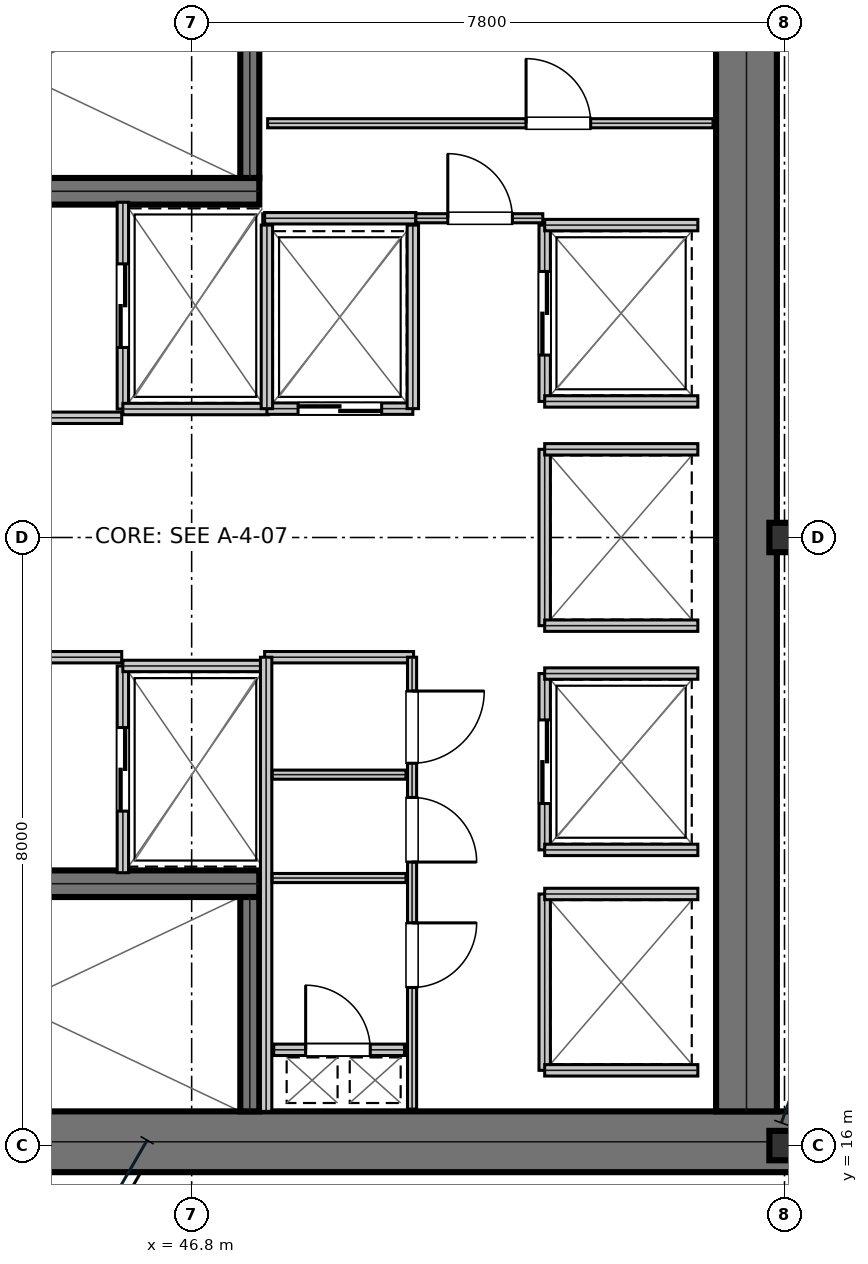
"""IFC4 building model, lengths in metres.
Left out: names, types, materials, properties, quantities, classifications, styles, units other than length and angle.
Written with IfcOpenShell. Run it as: python <this file> out.ifc"""

import sys

from ifc_helpers import new_model, si_unit, direction, frame, frame_2d, origin, origin_2d, place, context, subcontext, project, spatial, rectangle, i_section, extrude, element, fill, save


model = new_model("IFC4")
c1 = context("Model", 3, precision=1e-05, world=origin(), true_north=direction((0.0, 1.0)))
c2 = subcontext(c1, "Body", "Model", "MODEL_VIEW")
j1 = project(units=[si_unit("LENGTHUNIT", "METRE"), si_unit("PLANEANGLEUNIT", "RADIAN")], contexts=[c1])
p1 = place(None, origin())
s1 = spatial("IfcSite", under=j1, at=p1, CompositionType="ELEMENT")
p2 = place(p1, origin())
s2 = spatial("IfcBuilding", under=s1, at=p2, CompositionType="ELEMENT")
p3 = place(p2, frame((0.0, 0.0, 169.5)))
s3 = spatial("IfcBuildingStorey", under=s2, at=p3, CompositionType="ELEMENT", Elevation=169.5)
p4 = place(p3, frame((38.8, 16.05, 0.0), z_axis=(0.0, 0.0, 1.0), x_axis=(1.0, 0.0, 0.0)))
e1 = element("IfcWall", 1, at=p4, inside=s3, PredefinedType="SHEAR", context=c2, shape_type="SweptSolid", body=[
    extrude(rectangle(XDim=16.0, YDim=0.8, at=frame_2d((8.0, 0.0))), origin(), (0.0, 0.0, 1.0), 3.81),
])
p5 = place(p3, frame((54.1, 16.45, 0.0), z_axis=(0.0, 0.0, 1.0), x_axis=(0.0, 1.0, 0.0)))
e2 = element("IfcWall", 2, at=p5, inside=s3, PredefinedType="SHEAR", context=c2, shape_type="SweptSolid", body=[
    extrude(rectangle(XDim=15.1, YDim=0.8, at=frame_2d((7.55, 0.0))), origin(), (0.0, 0.0, 1.0), 3.81),
])
p6 = place(p3, frame((39.98, 28.555, 0.0), z_axis=(0.0, 0.0, 1.0), x_axis=(1.0, 0.0, 0.0)))
e3 = element("IfcWall", 3, at=p6, inside=s3, PredefinedType="SHEAR", context=c2, shape_type="SweptSolid", body=[
    extrude(rectangle(XDim=7.71, YDim=0.35, at=frame_2d((3.855, 0.0))), origin(), (0.0, 0.0, 1.0), 3.81),
])
p7 = place(p6, frame((0.25, 0.0, 0.0)))
e4 = element("IfcOpeningElement", 4, at=p7, cuts=e3, PredefinedType="OPENING", context=c2, shape_type="SweptSolid", body=[
    extrude(rectangle(XDim=1.1, YDim=2.15, at=frame_2d((0.55, 1.075))), frame((0.0, 0.185, 0.0), z_axis=(0.0, -1.0, 0.0), x_axis=(1.0, 0.0, 0.0)), (0.0, 0.0, 1.0), 0.37),
])
p8 = place(p3, frame((39.98, 19.445, 0.0), z_axis=(0.0, 0.0, 1.0), x_axis=(1.0, 0.0, 0.0)))
e5 = element("IfcWall", 5, at=p8, inside=s3, PredefinedType="SHEAR", context=c2, shape_type="SweptSolid", body=[
    extrude(rectangle(XDim=7.71, YDim=0.35, at=frame_2d((3.855, 0.0))), origin(), (0.0, 0.0, 1.0), 3.81),
])
p9 = place(p8, frame((0.25, 0.0, 0.0)))
e6 = element("IfcOpeningElement", 6, at=p9, cuts=e5, PredefinedType="OPENING", context=c2, shape_type="SweptSolid", body=[
    extrude(rectangle(XDim=1.1, YDim=2.15, at=frame_2d((0.55, 1.075))), frame((0.0, 0.185, 0.0), z_axis=(0.0, -1.0, 0.0), x_axis=(1.0, 0.0, 0.0)), (0.0, 0.0, 1.0), 0.37),
])
for number, where, z_axis, x_axis in (
    (7, (47.565, 28.73, 0.0), (0.0, 0.0, 1.0), (0.0, 1.0, 0.0)),
    (8, (47.565, 16.45, 0.0), (0.0, 0.0, 1.0), (0.0, 1.0, 0.0)),
):
    element("IfcWall", number, at=place(p3, frame(where, z_axis=z_axis, x_axis=x_axis)), inside=s3, PredefinedType="SHEAR", context=c2, shape_type="SweptSolid", body=[
        extrude(rectangle(XDim=2.82, YDim=0.25, at=frame_2d((1.41, 0.0))), origin(), (0.0, 0.0, 1.0), 3.81),
    ])
for number, where, z_axis, x_axis in (
    (9, (54.6, 16.0, 0.0), (0.0, 0.0, 1.0), (1.0, 0.0, 0.0)),
    (10, (54.6, 24.0, 0.0), (0.0, 0.0, 1.0), (1.0, 0.0, 0.0)),
):
    element("IfcColumn", number, at=place(p3, frame(where, z_axis=z_axis, x_axis=x_axis)), inside=s3, PredefinedType="COLUMN", context=c2, shape_type="SweptSolid", body=[
        extrude(i_section(OverallWidth=0.398, OverallDepth=0.387, WebThickness=0.021, FlangeThickness=0.033, at=origin_2d()), origin(), (0.0, 0.0, 1.0), 4.044),
    ])
p10 = place(p3, frame((39.98, 25.575, 0.0), z_axis=(0.0, 0.0, 1.0), x_axis=(1.0, 0.0, 0.0)))
e11 = element("IfcWall", 11, at=p10, inside=s3, PredefinedType="PARTITIONING", context=c2, shape_type="SweptSolid", body=[
    extrude(rectangle(XDim=5.9, YDim=0.15, at=frame_2d((2.95, 0.0))), origin(), (0.0, 0.0, 1.0), 3.81),
])
p11 = place(p10, frame((2.35, 0.0, 0.0)))
e12 = element("IfcOpeningElement", 12, at=p11, cuts=e11, PredefinedType="OPENING", context=c2, shape_type="SweptSolid", body=[
    extrude(rectangle(XDim=1.05, YDim=2.15, at=frame_2d((0.525, 1.075))), frame((0.0, 0.085, 0.0), z_axis=(0.0, -1.0, 0.0), x_axis=(1.0, 0.0, 0.0)), (0.0, 0.0, 1.0), 0.17),
])
p12 = place(p3, frame((39.98, 22.425, 0.0), z_axis=(0.0, 0.0, 1.0), x_axis=(1.0, 0.0, 0.0)))
e13 = element("IfcWall", 13, at=p12, inside=s3, PredefinedType="PARTITIONING", context=c2, shape_type="SweptSolid", body=[
    extrude(rectangle(XDim=5.9, YDim=0.15, at=frame_2d((2.95, 0.0))), origin(), (0.0, 0.0, 1.0), 3.81),
])
p13 = place(p12, frame((2.35, 0.0, 0.0)))
e14 = element("IfcOpeningElement", 14, at=p13, cuts=e13, PredefinedType="OPENING", context=c2, shape_type="SweptSolid", body=[
    extrude(rectangle(XDim=1.05, YDim=2.15, at=frame_2d((0.525, 1.075))), frame((0.0, 0.085, 0.0), z_axis=(0.0, -1.0, 0.0), x_axis=(1.0, 0.0, 0.0)), (0.0, 0.0, 1.0), 0.17),
])
p14 = place(p3, frame((45.895, 25.69, 0.0), z_axis=(0.0, 0.0, 1.0), x_axis=(0.0, 1.0, 0.0)))
e15 = element("IfcWall", 15, at=p14, inside=s3, PredefinedType="PARTITIONING", context=c2, shape_type="SweptSolid", body=[
    extrude(rectangle(XDim=2.72, YDim=0.15, at=frame_2d((1.36, 0.0))), origin(), (0.0, 0.0, 1.0), 3.81),
])
p15 = place(p14, frame((0.81, 0.0, 0.0)))
e16 = element("IfcOpeningElement", 16, at=p15, cuts=e15, PredefinedType="OPENING", context=c2, shape_type="SweptSolid", body=[
    extrude(rectangle(XDim=1.1, YDim=2.15, at=frame_2d((0.55, 1.075))), frame((0.0, 0.085, 0.0), z_axis=(0.0, -1.0, 0.0), x_axis=(1.0, 0.0, 0.0)), (0.0, 0.0, 1.0), 0.17),
])
p16 = place(p3, frame((45.895, 25.69, 0.0), z_axis=(0.0, 0.0, 1.0), x_axis=(1.0, 0.0, 0.0)))
e17 = element("IfcWall", 17, at=p16, inside=s3, PredefinedType="PARTITIONING", context=c2, shape_type="SweptSolid", body=[
    extrude(rectangle(XDim=1.915, YDim=0.15, at=frame_2d((0.958, 0.0))), origin(), (0.0, 0.0, 1.0), 3.81),
])
p17 = place(p3, frame((45.895, 19.59, 0.0), z_axis=(0.0, 0.0, 1.0), x_axis=(0.0, 1.0, 0.0)))
e18 = element("IfcWall", 18, at=p17, inside=s3, PredefinedType="PARTITIONING", context=c2, shape_type="SweptSolid", body=[
    extrude(rectangle(XDim=2.72, YDim=0.15, at=frame_2d((1.36, 0.0))), origin(), (0.0, 0.0, 1.0), 3.81),
])
p18 = place(p17, frame((0.81, 0.0, 0.0)))
e19 = element("IfcOpeningElement", 19, at=p18, cuts=e18, PredefinedType="OPENING", context=c2, shape_type="SweptSolid", body=[
    extrude(rectangle(XDim=1.1, YDim=2.15, at=frame_2d((0.55, 1.075))), frame((0.0, 0.085, 0.0), z_axis=(0.0, -1.0, 0.0), x_axis=(1.0, 0.0, 0.0)), (0.0, 0.0, 1.0), 0.17),
])
p19 = place(p3, frame((45.895, 22.31, 0.0), z_axis=(0.0, 0.0, 1.0), x_axis=(1.0, 0.0, 0.0)))
e20 = element("IfcWall", 20, at=p19, inside=s3, PredefinedType="PARTITIONING", context=c2, shape_type="SweptSolid", body=[
    extrude(rectangle(XDim=1.915, YDim=0.15, at=frame_2d((0.958, 0.0))), origin(), (0.0, 0.0, 1.0), 3.81),
])
p20 = place(p3, frame((47.79, 25.695, 0.0), z_axis=(0.0, 0.0, 1.0), x_axis=(1.0, 0.0, 0.0)))
e21 = element("IfcWall", 21, at=p20, inside=s3, PredefinedType="PARTITIONING", context=c2, shape_type="SweptSolid", body=[
    extrude(rectangle(XDim=1.92, YDim=0.15, at=frame_2d((0.96, 0.0))), origin(), (0.0, 0.0, 1.0), 3.81),
])
p21 = place(p20, frame((0.41, 0.0, 0.0)))
e22 = element("IfcOpeningElement", 22, at=p21, cuts=e21, PredefinedType="OPENING", context=c2, shape_type="SweptSolid", body=[
    extrude(rectangle(XDim=1.1, YDim=2.15, at=frame_2d((0.55, 1.075))), frame((0.0, 0.085, 0.0), z_axis=(0.0, -1.0, 0.0), x_axis=(1.0, 0.0, 0.0)), (0.0, 0.0, 1.0), 0.17),
])
for number, where, z_axis, x_axis in (
    (23, (47.79, 25.695, 0.0), (0.0, 0.0, 1.0), (0.0, 1.0, 0.0)),
    (24, (49.71, 25.695, 0.0), (0.0, 0.0, 1.0), (0.0, 1.0, 0.0)),
):
    element("IfcWall", number, at=place(p3, frame(where, z_axis=z_axis, x_axis=x_axis)), inside=s3, PredefinedType="PARTITIONING", context=c2, shape_type="SweptSolid", body=[
        extrude(rectangle(XDim=2.415, YDim=0.15, at=frame_2d((1.208, 0.0))), origin(), (0.0, 0.0, 1.0), 3.81),
    ])
p22 = place(p3, frame((51.445, 25.79, 0.0), z_axis=(0.0, 0.0, 1.0), x_axis=(0.0, 1.0, 0.0)))
e25 = element("IfcWall", 25, at=p22, inside=s3, PredefinedType="PARTITIONING", context=c2, shape_type="SweptSolid", body=[
    extrude(rectangle(XDim=2.32, YDim=0.15, at=frame_2d((1.16, 0.0))), origin(), (0.0, 0.0, 1.0), 3.81),
])
p23 = place(p22, frame((0.61, 0.0, 0.0)))
e26 = element("IfcOpeningElement", 26, at=p23, cuts=e25, PredefinedType="OPENING", context=c2, shape_type="SweptSolid", body=[
    extrude(rectangle(XDim=1.1, YDim=2.15, at=frame_2d((0.55, 1.075))), frame((0.0, 0.085, 0.0), z_axis=(0.0, -1.0, 0.0), x_axis=(1.0, 0.0, 0.0)), (0.0, 0.0, 1.0), 0.17),
])
for number, where, z_axis, x_axis in (
    (27, (51.445, 25.79, 0.0), (0.0, 0.0, 1.0), (1.0, 0.0, 0.0)),
    (28, (51.445, 28.11, 0.0), (0.0, 0.0, 1.0), (1.0, 0.0, 0.0)),
):
    element("IfcWall", number, at=place(p3, frame(where, z_axis=z_axis, x_axis=x_axis)), inside=s3, PredefinedType="PARTITIONING", context=c2, shape_type="SweptSolid", body=[
        extrude(rectangle(XDim=2.015, YDim=0.15, at=frame_2d((1.007, 0.0))), origin(), (0.0, 0.0, 1.0), 3.81),
    ])
p24 = place(p3, frame((51.445, 19.89, 0.0), z_axis=(0.0, 0.0, 1.0), x_axis=(0.0, 1.0, 0.0)))
e29 = element("IfcWall", 29, at=p24, inside=s3, PredefinedType="PARTITIONING", context=c2, shape_type="SweptSolid", body=[
    extrude(rectangle(XDim=2.32, YDim=0.15, at=frame_2d((1.16, 0.0))), origin(), (0.0, 0.0, 1.0), 3.81),
])
p25 = place(p24, frame((0.61, 0.0, 0.0)))
e30 = element("IfcOpeningElement", 30, at=p25, cuts=e29, PredefinedType="OPENING", context=c2, shape_type="SweptSolid", body=[
    extrude(rectangle(XDim=1.1, YDim=2.15, at=frame_2d((0.55, 1.075))), frame((0.0, 0.085, 0.0), z_axis=(0.0, -1.0, 0.0), x_axis=(1.0, 0.0, 0.0)), (0.0, 0.0, 1.0), 0.17),
])
for number, where, z_axis, x_axis in (
    (31, (51.445, 19.89, 0.0), (0.0, 0.0, 1.0), (1.0, 0.0, 0.0)),
    (32, (51.445, 22.21, 0.0), (0.0, 0.0, 1.0), (1.0, 0.0, 0.0)),
):
    element("IfcWall", number, at=place(p3, frame(where, z_axis=z_axis, x_axis=x_axis)), inside=s3, PredefinedType="PARTITIONING", context=c2, shape_type="SweptSolid", body=[
        extrude(rectangle(XDim=2.015, YDim=0.15, at=frame_2d((1.007, 0.0))), origin(), (0.0, 0.0, 1.0), 3.81),
    ])
p26 = place(p3, frame((51.445, 22.84, 0.0), z_axis=(0.0, 0.0, 1.0), x_axis=(0.0, 1.0, 0.0)))
e33 = element("IfcWall", 33, at=p26, inside=s3, PredefinedType="PARTITIONING", context=c2, shape_type="SweptSolid", body=[
    extrude(rectangle(XDim=2.32, YDim=0.15, at=frame_2d((1.16, 0.0))), origin(), (0.0, 0.0, 1.0), 3.81),
])
for number, where, z_axis, x_axis in (
    (34, (51.445, 22.84, 0.0), (0.0, 0.0, 1.0), (1.0, 0.0, 0.0)),
    (35, (51.445, 25.16, 0.0), (0.0, 0.0, 1.0), (1.0, 0.0, 0.0)),
):
    element("IfcWall", number, at=place(p3, frame(where, z_axis=z_axis, x_axis=x_axis)), inside=s3, PredefinedType="PARTITIONING", context=c2, shape_type="SweptSolid", body=[
        extrude(rectangle(XDim=2.015, YDim=0.15, at=frame_2d((1.007, 0.0))), origin(), (0.0, 0.0, 1.0), 3.81),
    ])
p27 = place(p3, frame((51.445, 16.99, 0.0), z_axis=(0.0, 0.0, 1.0), x_axis=(0.0, 1.0, 0.0)))
e36 = element("IfcWall", 36, at=p27, inside=s3, PredefinedType="PARTITIONING", context=c2, shape_type="SweptSolid", body=[
    extrude(rectangle(XDim=2.32, YDim=0.15, at=frame_2d((1.16, 0.0))), origin(), (0.0, 0.0, 1.0), 3.81),
])
for number, where, z_axis, x_axis in (
    (37, (51.445, 16.99, 0.0), (0.0, 0.0, 1.0), (1.0, 0.0, 0.0)),
    (38, (51.445, 19.31, 0.0), (0.0, 0.0, 1.0), (1.0, 0.0, 0.0)),
):
    element("IfcWall", number, at=place(p3, frame(where, z_axis=z_axis, x_axis=x_axis)), inside=s3, PredefinedType="PARTITIONING", context=c2, shape_type="SweptSolid", body=[
        extrude(rectangle(XDim=2.015, YDim=0.15, at=frame_2d((1.007, 0.0))), origin(), (0.0, 0.0, 1.0), 3.81),
    ])
p28 = place(p3, frame((47.88, 17.26, 0.0), z_axis=(0.0, 0.0, 1.0), x_axis=(1.0, 0.0, 0.0)))
e39 = element("IfcWall", 39, at=p28, inside=s3, PredefinedType="PARTITIONING", context=c2, shape_type="SweptSolid", body=[
    extrude(rectangle(XDim=1.72, YDim=0.15, at=frame_2d((0.86, 0.0))), origin(), (0.0, 0.0, 1.0), 3.81),
])
p29 = place(p28, frame((0.42, 0.0, 0.0)))
e40 = element("IfcOpeningElement", 40, at=p29, cuts=e39, PredefinedType="OPENING", context=c2, shape_type="SweptSolid", body=[
    extrude(rectangle(XDim=0.85, YDim=2.15, at=frame_2d((0.425, 1.075))), frame((0.0, 0.085, 0.0), z_axis=(0.0, -1.0, 0.0), x_axis=(1.0, 0.0, 0.0)), (0.0, 0.0, 1.0), 0.17),
])
p30 = place(p3, frame((47.76, 22.425, 0.0), z_axis=(0.0, 0.0, 1.0), x_axis=(1.0, 0.0, 0.0)))
e41 = element("IfcWall", 41, at=p30, inside=s3, PredefinedType="PARTITIONING", context=c2, shape_type="SweptSolid", body=[
    extrude(rectangle(XDim=1.96, YDim=0.15, at=frame_2d((0.98, 0.0))), origin(), (0.0, 0.0, 1.0), 3.81),
])
p31 = place(p3, frame((47.78, 16.45, 0.0), z_axis=(0.0, 0.0, 1.0), x_axis=(0.0, 1.0, 0.0)))
e42 = element("IfcWall", 42, at=p31, inside=s3, PredefinedType="PARTITIONING", context=c2, shape_type="SweptSolid", body=[
    extrude(rectangle(XDim=5.975, YDim=0.15, at=frame_2d((2.988, 0.0))), origin(), (0.0, 0.0, 1.0), 3.81),
])
for number, where, z_axis, x_axis in (
    (43, (47.86, 19.52, 0.0), (0.0, 0.0, 1.0), (1.0, 0.0, 0.0)),
    (44, (47.86, 20.88, 0.0), (0.0, 0.0, 1.0), (1.0, 0.0, 0.0)),
):
    element("IfcWall", number, at=place(p3, frame(where, z_axis=z_axis, x_axis=x_axis)), inside=s3, PredefinedType="PARTITIONING", context=c2, shape_type="SweptSolid", body=[
        extrude(rectangle(XDim=1.76, YDim=0.12, at=frame_2d((0.88, 0.0))), origin(), (0.0, 0.0, 1.0), 3.81),
    ])
p32 = place(p3, frame((49.7, 16.48, 0.0), z_axis=(0.0, 0.0, 1.0), x_axis=(0.0, 1.0, 0.0)))
e45 = element("IfcWall", 45, at=p32, inside=s3, PredefinedType="PARTITIONING", context=c2, shape_type="SweptSolid", body=[
    extrude(rectangle(XDim=5.945, YDim=0.12, at=frame_2d((2.973, 0.0))), origin(), (0.0, 0.0, 1.0), 3.81),
])
p33 = place(p32, frame((1.6, 0.0, 0.0)))
e46 = element("IfcOpeningElement", 46, at=p33, cuts=e45, PredefinedType="OPENING", context=c2, shape_type="SweptSolid", body=[
    extrude(rectangle(XDim=0.85, YDim=2.15, at=frame_2d((0.425, 1.075))), frame((0.0, 0.07, 0.0), z_axis=(0.0, -1.0, 0.0), x_axis=(1.0, 0.0, 0.0)), (0.0, 0.0, 1.0), 0.14),
])
p34 = place(p32, frame((3.25, 0.0, 0.0)))
e47 = element("IfcOpeningElement", 47, at=p34, cuts=e45, PredefinedType="OPENING", context=c2, shape_type="SweptSolid", body=[
    extrude(rectangle(XDim=0.85, YDim=2.15, at=frame_2d((0.425, 1.075))), frame((0.0, 0.07, 0.0), z_axis=(0.0, -1.0, 0.0), x_axis=(1.0, 0.0, 0.0)), (0.0, 0.0, 1.0), 0.14),
])
p35 = place(p32, frame((4.55, 0.0, 0.0)))
e48 = element("IfcOpeningElement", 48, at=p35, cuts=e45, PredefinedType="OPENING", context=c2, shape_type="SweptSolid", body=[
    extrude(rectangle(XDim=0.95, YDim=2.15, at=frame_2d((0.475, 1.075))), frame((0.0, 0.07, 0.0), z_axis=(0.0, -1.0, 0.0), x_axis=(1.0, 0.0, 0.0)), (0.0, 0.0, 1.0), 0.14),
])
p36 = place(p3, frame((47.76, 28.2, 0.0), z_axis=(0.0, 0.0, 1.0), x_axis=(1.0, 0.0, 0.0)))
e49 = element("IfcWall", 49, at=p36, inside=s3, PredefinedType="PARTITIONING", context=c2, shape_type="SweptSolid", body=[
    extrude(rectangle(XDim=1.99, YDim=0.15, at=frame_2d((0.995, 0.0))), origin(), (0.0, 0.0, 1.0), 3.81),
])
p37 = place(p3, frame((49.75, 28.2, 0.0), z_axis=(0.0, 0.0, 1.0), x_axis=(1.0, 0.0, 0.0)))
e50 = element("IfcWall", 50, at=p37, inside=s3, PredefinedType="PARTITIONING", context=c2, shape_type="SweptSolid", body=[
    extrude(rectangle(XDim=1.67, YDim=0.12, at=frame_2d((0.835, 0.0))), origin(), (0.0, 0.0, 1.0), 3.81),
])
p38 = place(p37, frame((0.42, 0.0, 0.0)))
e51 = element("IfcOpeningElement", 51, at=p38, cuts=e50, PredefinedType="OPENING", context=c2, shape_type="SweptSolid", body=[
    extrude(rectangle(XDim=0.85, YDim=2.15, at=frame_2d((0.425, 1.075))), frame((0.0, 0.07, 0.0), z_axis=(0.0, -1.0, 0.0), x_axis=(1.0, 0.0, 0.0)), (0.0, 0.0, 1.0), 0.14),
])
p39 = place(p3, frame((47.8, 29.45, 0.0), z_axis=(0.0, 0.0, 1.0), x_axis=(1.0, 0.0, 0.0)))
e52 = element("IfcWall", 52, at=p39, inside=s3, PredefinedType="PARTITIONING", context=c2, shape_type="SweptSolid", body=[
    extrude(rectangle(XDim=5.86, YDim=0.12, at=frame_2d((2.93, 0.0))), origin(), (0.0, 0.0, 1.0), 3.81),
])
p40 = place(p39, frame((3.4, 0.0, 0.0)))
e53 = element("IfcOpeningElement", 53, at=p40, cuts=e52, PredefinedType="OPENING", context=c2, shape_type="SweptSolid", body=[
    extrude(rectangle(XDim=0.85, YDim=2.15, at=frame_2d((0.425, 1.075))), frame((0.0, 0.07, 0.0), z_axis=(0.0, -1.0, 0.0), x_axis=(1.0, 0.0, 0.0)), (0.0, 0.0, 1.0), 0.14),
])
p41 = place(p15, frame((1.1, 0.0, 0.0), z_axis=(0.0, 0.0, 1.0), x_axis=(-1.0, 0.0, 0.0)))
e54 = element("IfcDoor", 54, at=p41, inside=s3, OperationType="DOUBLE_DOOR_SLIDING", PredefinedType="DOOR", context=c2, shape_type="SweptSolid", body=[
    extrude(rectangle(XDim=1.1, YDim=2.15, at=frame_2d((0.55, 1.075))), frame((0.0, 0.025, 0.0), z_axis=(0.0, -1.0, 0.0), x_axis=(1.0, 0.0, 0.0)), (0.0, 0.0, 1.0), 0.05),
])
fill(e16, e54)
p42 = place(p18, frame((1.1, 0.0, 0.0), z_axis=(0.0, 0.0, 1.0), x_axis=(-1.0, 0.0, 0.0)))
e55 = element("IfcDoor", 55, at=p42, inside=s3, OperationType="DOUBLE_DOOR_SLIDING", PredefinedType="DOOR", context=c2, shape_type="SweptSolid", body=[
    extrude(rectangle(XDim=1.1, YDim=2.15, at=frame_2d((0.55, 1.075))), frame((0.0, 0.025, 0.0), z_axis=(0.0, -1.0, 0.0), x_axis=(1.0, 0.0, 0.0)), (0.0, 0.0, 1.0), 0.05),
])
fill(e19, e55)
p43 = place(p21, frame((1.1, 0.0, 0.0), z_axis=(0.0, 0.0, 1.0), x_axis=(-1.0, 0.0, 0.0)))
e56 = element("IfcDoor", 56, at=p43, inside=s3, OperationType="DOUBLE_DOOR_SLIDING", PredefinedType="DOOR", context=c2, shape_type="SweptSolid", body=[
    extrude(rectangle(XDim=1.1, YDim=2.15, at=frame_2d((0.55, 1.075))), frame((0.0, 0.025, 0.0), z_axis=(0.0, -1.0, 0.0), x_axis=(1.0, 0.0, 0.0)), (0.0, 0.0, 1.0), 0.05),
])
fill(e22, e56)
p44 = place(p23, frame((1.1, 0.0, 0.0), z_axis=(0.0, 0.0, 1.0), x_axis=(-1.0, 0.0, 0.0)))
e57 = element("IfcDoor", 57, at=p44, inside=s3, OperationType="DOUBLE_DOOR_SLIDING", PredefinedType="DOOR", context=c2, shape_type="SweptSolid", body=[
    extrude(rectangle(XDim=1.1, YDim=2.15, at=frame_2d((0.55, 1.075))), frame((0.0, 0.025, 0.0), z_axis=(0.0, -1.0, 0.0), x_axis=(1.0, 0.0, 0.0)), (0.0, 0.0, 1.0), 0.05),
])
fill(e26, e57)
p45 = place(p25, frame((1.1, 0.0, 0.0), z_axis=(0.0, 0.0, 1.0), x_axis=(-1.0, 0.0, 0.0)))
e58 = element("IfcDoor", 58, at=p45, inside=s3, OperationType="DOUBLE_DOOR_SLIDING", PredefinedType="DOOR", context=c2, shape_type="SweptSolid", body=[
    extrude(rectangle(XDim=1.1, YDim=2.15, at=frame_2d((0.55, 1.075))), frame((0.0, 0.025, 0.0), z_axis=(0.0, -1.0, 0.0), x_axis=(1.0, 0.0, 0.0)), (0.0, 0.0, 1.0), 0.05),
])
fill(e30, e58)
p46 = place(p29, origin())
e59 = element("IfcDoor", 59, at=p46, inside=s3, OperationType="SINGLE_SWING_LEFT", PredefinedType="TRAPDOOR", context=c2, shape_type="SweptSolid", body=[
    extrude(rectangle(XDim=0.85, YDim=2.15, at=frame_2d((0.425, 1.075))), frame((0.0, 0.025, 0.0), z_axis=(0.0, -1.0, 0.0), x_axis=(1.0, 0.0, 0.0)), (0.0, 0.0, 1.0), 0.05),
])
fill(e40, e59)
p47 = place(p33, frame((0.85, 0.0, 0.0), z_axis=(0.0, 0.0, 1.0), x_axis=(-1.0, 0.0, 0.0)))
e60 = element("IfcDoor", 60, at=p47, inside=s3, OperationType="SINGLE_SWING_LEFT", PredefinedType="DOOR", context=c2, shape_type="SweptSolid", body=[
    extrude(rectangle(XDim=0.85, YDim=2.15, at=frame_2d((0.425, 1.075))), frame((0.0, 0.025, 0.0), z_axis=(0.0, -1.0, 0.0), x_axis=(1.0, 0.0, 0.0)), (0.0, 0.0, 1.0), 0.05),
])
fill(e46, e60)
p48 = place(p34, frame((0.85, 0.0, 0.0), z_axis=(0.0, 0.0, 1.0), x_axis=(-1.0, 0.0, 0.0)))
e61 = element("IfcDoor", 61, at=p48, inside=s3, OperationType="SINGLE_SWING_RIGHT", PredefinedType="DOOR", context=c2, shape_type="SweptSolid", body=[
    extrude(rectangle(XDim=0.85, YDim=2.15, at=frame_2d((0.425, 1.075))), frame((0.0, 0.025, 0.0), z_axis=(0.0, -1.0, 0.0), x_axis=(1.0, 0.0, 0.0)), (0.0, 0.0, 1.0), 0.05),
])
fill(e47, e61)
p49 = place(p35, frame((0.95, 0.0, 0.0), z_axis=(0.0, 0.0, 1.0), x_axis=(-1.0, 0.0, 0.0)))
e62 = element("IfcDoor", 62, at=p49, inside=s3, OperationType="SINGLE_SWING_LEFT", PredefinedType="DOOR", context=c2, shape_type="SweptSolid", body=[
    extrude(rectangle(XDim=0.95, YDim=2.15, at=frame_2d((0.475, 1.075))), frame((0.0, 0.025, 0.0), z_axis=(0.0, -1.0, 0.0), x_axis=(1.0, 0.0, 0.0)), (0.0, 0.0, 1.0), 0.05),
])
fill(e48, e62)
p50 = place(p38, origin())
e63 = element("IfcDoor", 63, at=p50, inside=s3, OperationType="SINGLE_SWING_LEFT", PredefinedType="DOOR", context=c2, shape_type="SweptSolid", body=[
    extrude(rectangle(XDim=0.85, YDim=2.15, at=frame_2d((0.425, 1.075))), frame((0.0, 0.025, 0.0), z_axis=(0.0, -1.0, 0.0), x_axis=(1.0, 0.0, 0.0)), (0.0, 0.0, 1.0), 0.05),
])
fill(e51, e63)
p51 = place(p40, origin())
e64 = element("IfcDoor", 64, at=p51, inside=s3, OperationType="SINGLE_SWING_LEFT", PredefinedType="DOOR", context=c2, shape_type="SweptSolid", body=[
    extrude(rectangle(XDim=0.85, YDim=2.15, at=frame_2d((0.425, 1.075))), frame((0.0, 0.025, 0.0), z_axis=(0.0, -1.0, 0.0), x_axis=(1.0, 0.0, 0.0)), (0.0, 0.0, 1.0), 0.05),
])
fill(e53, e64)
save(model, sys.argv[1])
